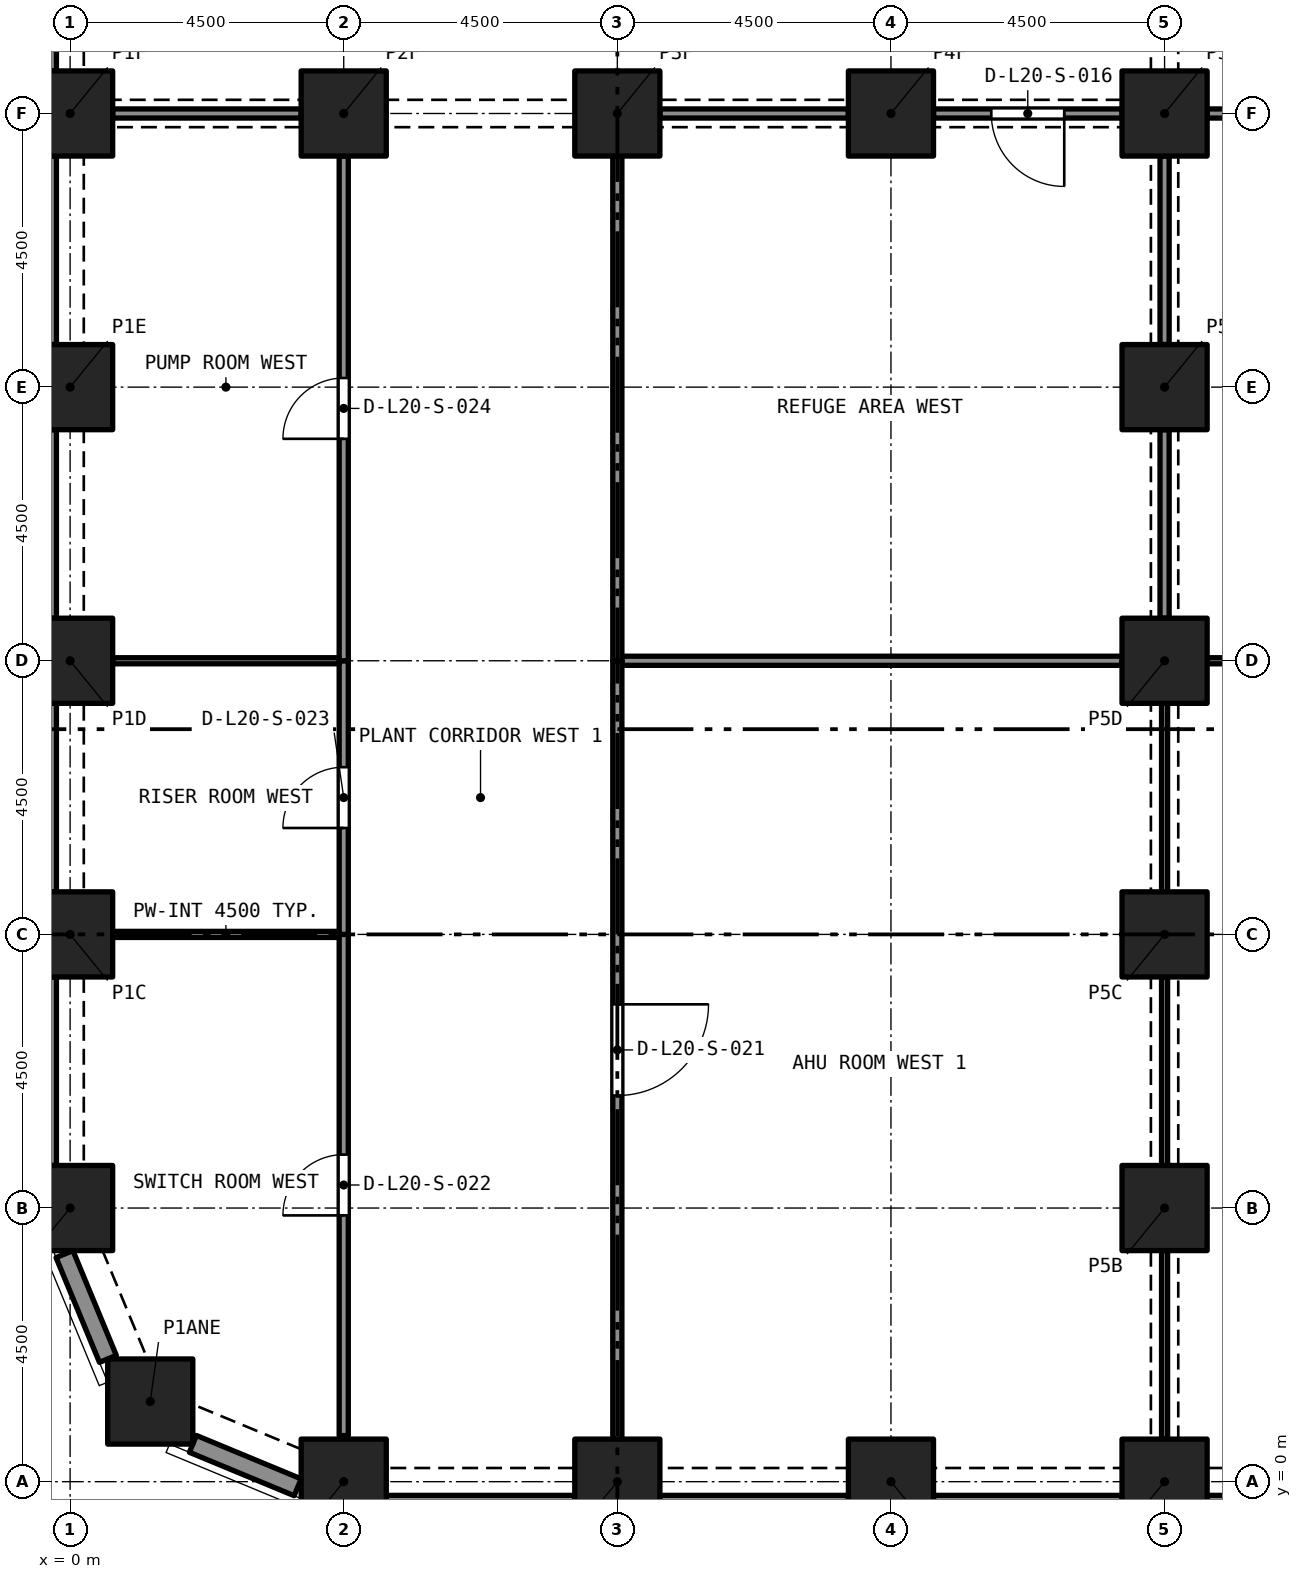
"""IFC4 building model, lengths in metres.
Left out: names, types, materials, properties, quantities, classifications, styles, units other than length and angle.
Written with IfcOpenShell. Run it as: python <this file> out.ifc"""

import sys

from ifc_helpers import new_model, si_unit, direction, frame, frame_2d, origin, origin_2d, place, context, subcontext, project, spatial, rectangle, extrude, element, fill, save


model = new_model("IFC4")
c1 = context("Model", 3, precision=1e-05, world=origin(), true_north=direction((0.0, 1.0)))
c2 = subcontext(c1, "Body", "Model", "MODEL_VIEW")
j1 = project(units=[si_unit("LENGTHUNIT", "METRE"), si_unit("PLANEANGLEUNIT", "RADIAN")], contexts=[c1])
p1 = place(None, origin())
s1 = spatial("IfcSite", under=j1, at=p1, CompositionType="ELEMENT")
p2 = place(p1, origin())
s2 = spatial("IfcBuilding", under=s1, at=p2, CompositionType="ELEMENT")
p3 = place(p2, frame((0.0, 0.0, 75.2)))
s3 = spatial("IfcBuildingStorey", under=s2, at=p3, CompositionType="ELEMENT", Elevation=75.2)
for number, where, z_axis, x_axis in (
    (1, (4.5, 0.0, 0.0), (0.0, 0.0, 1.0), (1.0, 0.0, 0.0)),
    (2, (9.0, 0.0, 0.0), (0.0, 0.0, 1.0), (1.0, 0.0, 0.0)),
    (3, (13.5, 0.0, 0.0), (0.0, 0.0, 1.0), (1.0, 0.0, 0.0)),
    (4, (18.0, 0.0, 0.0), (0.0, 0.0, 1.0), (1.0, 0.0, 0.0)),
    (5, (1.318, 1.318, 0.0), (0.0, 0.0, 1.0), (1.0, 0.0, 0.0)),
    (6, (0.0, 4.5, 0.0), (0.0, 0.0, 1.0), (1.0, 0.0, 0.0)),
    (7, (18.0, 4.5, 0.0), (0.0, 0.0, 1.0), (1.0, 0.0, 0.0)),
    (8, (0.0, 9.0, 0.0), (0.0, 0.0, 1.0), (1.0, 0.0, 0.0)),
    (9, (18.0, 9.0, 0.0), (0.0, 0.0, 1.0), (1.0, 0.0, 0.0)),
    (10, (0.0, 13.5, 0.0), (0.0, 0.0, 1.0), (1.0, 0.0, 0.0)),
    (11, (18.0, 13.5, 0.0), (0.0, 0.0, 1.0), (1.0, 0.0, 0.0)),
    (12, (0.0, 18.0, 0.0), (0.0, 0.0, 1.0), (1.0, 0.0, 0.0)),
    (13, (18.0, 18.0, 0.0), (0.0, 0.0, 1.0), (1.0, 0.0, 0.0)),
    (14, (0.0, 22.5, 0.0), (0.0, 0.0, 1.0), (1.0, 0.0, 0.0)),
    (15, (4.5, 22.5, 0.0), (0.0, 0.0, 1.0), (1.0, 0.0, 0.0)),
    (16, (9.0, 22.5, 0.0), (0.0, 0.0, 1.0), (1.0, 0.0, 0.0)),
    (17, (13.5, 22.5, 0.0), (0.0, 0.0, 1.0), (1.0, 0.0, 0.0)),
    (18, (18.0, 22.5, 0.0), (0.0, 0.0, 1.0), (1.0, 0.0, 0.0)),
):
    element("IfcColumn", number, at=place(p3, frame(where, z_axis=z_axis, x_axis=x_axis)), inside=s3, PredefinedType="COLUMN", context=c2, shape_type="SweptSolid", body=[
        extrude(rectangle(XDim=1.4, YDim=1.4, at=origin_2d()), origin(), (0.0, 0.0, 1.0), 4.8),
    ])
p4 = place(p3, frame((0.622, 2.02, 0.0), z_axis=(0.0, 0.0, 1.0), x_axis=(-0.38262540684, 0.923903565336, 0.0)))
e19 = element("IfcWall", 19, at=p4, inside=s3, PredefinedType="SOLIDWALL", context=c2, shape_type="SweptSolid", body=[
    extrude(rectangle(XDim=1.865, YDim=0.3, at=frame_2d((0.933, 0.0))), origin(), (0.0, 0.0, 1.0), 4.8),
])
p5 = place(p3, frame((3.743, -0.092, 0.0), z_axis=(0.0, 0.0, 1.0), x_axis=(-0.923857286003, 0.382737135771, 0.0)))
e20 = element("IfcWall", 20, at=p5, inside=s3, PredefinedType="SOLIDWALL", context=c2, shape_type="SweptSolid", body=[
    extrude(rectangle(XDim=1.865, YDim=0.3, at=frame_2d((0.933, 0.0))), origin(), (0.0, 0.0, 1.0), 4.8),
])
for number, where, z_axis, x_axis in (
    (21, (8.3, -0.375, 0.0), (0.0, 0.0, 1.0), (-1.0, 0.0, 0.0)),
    (22, (12.8, -0.375, 0.0), (0.0, 0.0, 1.0), (-1.0, 0.0, 0.0)),
    (23, (17.3, -0.375, 0.0), (0.0, 0.0, 1.0), (-1.0, 0.0, 0.0)),
    (24, (21.8, -0.375, 0.0), (0.0, 0.0, 1.0), (-1.0, 0.0, 0.0)),
    (25, (-0.375, 23.2, 0.0), (0.0, 0.0, 1.0), (0.0, 1.0, 0.0)),
    (26, (-0.375, 18.7, 0.0), (0.0, 0.0, 1.0), (0.0, 1.0, 0.0)),
    (27, (-0.375, 14.2, 0.0), (0.0, 0.0, 1.0), (0.0, 1.0, 0.0)),
    (28, (-0.375, 9.7, 0.0), (0.0, 0.0, 1.0), (0.0, 1.0, 0.0)),
    (29, (-0.375, 5.2, 0.0), (0.0, 0.0, 1.0), (0.0, 1.0, 0.0)),
):
    element("IfcWall", number, at=place(p3, frame(where, z_axis=z_axis, x_axis=x_axis)), inside=s3, PredefinedType="SOLIDWALL", context=c2, shape_type="SweptSolid", body=[
        extrude(rectangle(XDim=3.1, YDim=0.3, at=frame_2d((1.55, 0.0))), origin(), (0.0, 0.0, 1.0), 4.8),
    ])
p6 = place(p3, frame((30.8, 22.5, 0.0), z_axis=(0.0, 0.0, 1.0), x_axis=(-1.0, 0.0, 0.0)))
e30 = element("IfcWall", 30, at=p6, inside=s3, PredefinedType="PARTITIONING", context=c2, shape_type="SweptSolid", body=[
    extrude(rectangle(XDim=12.1, YDim=0.15, at=frame_2d((6.05, 0.0))), origin(), (0.0, 0.0, 1.0), 4.35),
])
p7 = place(p6, frame((5.3, 0.0, 0.0)))
e31 = element("IfcOpeningElement", 31, at=p7, cuts=e30, PredefinedType="OPENING", context=c2, shape_type="SweptSolid", body=[
    extrude(rectangle(XDim=1.5, YDim=2.4, at=frame_2d((0.75, 1.2))), frame((0.0, 0.085, 0.0), z_axis=(0.0, -1.0, 0.0), x_axis=(1.0, 0.0, 0.0)), (0.0, 0.0, 1.0), 0.17),
])
p8 = place(p3, frame((30.8, 13.5, 0.0), z_axis=(0.0, 0.0, 1.0), x_axis=(-1.0, 0.0, 0.0)))
e32 = element("IfcWall", 32, at=p8, inside=s3, PredefinedType="PARTITIONING", context=c2, shape_type="SweptSolid", body=[
    extrude(rectangle(XDim=12.1, YDim=0.1, at=frame_2d((6.05, 0.0))), origin(), (0.0, 0.0, 1.0), 4.35),
])
p9 = place(p8, frame((5.3, 0.0, 0.0)))
e33 = element("IfcOpeningElement", 33, at=p9, cuts=e32, PredefinedType="OPENING", context=c2, shape_type="SweptSolid", body=[
    extrude(rectangle(XDim=1.5, YDim=2.4, at=frame_2d((0.75, 1.2))), frame((0.0, 0.06, 0.0), z_axis=(0.0, -1.0, 0.0), x_axis=(1.0, 0.0, 0.0)), (0.0, 0.0, 1.0), 0.12),
])
for number, where, z_axis, x_axis in (
    (34, (18.0, 0.7, 0.0), (0.0, 0.0, 1.0), (0.0, 1.0, 0.0)),
    (35, (18.0, 5.2, 0.0), (0.0, 0.0, 1.0), (0.0, 1.0, 0.0)),
    (36, (18.0, 9.7, 0.0), (0.0, 0.0, 1.0), (0.0, 1.0, 0.0)),
):
    element("IfcWall", number, at=place(p3, frame(where, z_axis=z_axis, x_axis=x_axis)), inside=s3, PredefinedType="PARTITIONING", context=c2, shape_type="SweptSolid", body=[
        extrude(rectangle(XDim=3.1, YDim=0.1, at=frame_2d((1.55, 0.0))), origin(), (0.0, 0.0, 1.0), 3.98),
    ])
for number, where, z_axis, x_axis in (
    (37, (18.0, 14.2, 0.0), (0.0, 0.0, 1.0), (0.0, 1.0, 0.0)),
    (38, (18.0, 18.7, 0.0), (0.0, 0.0, 1.0), (0.0, 1.0, 0.0)),
):
    element("IfcWall", number, at=place(p3, frame(where, z_axis=z_axis, x_axis=x_axis)), inside=s3, PredefinedType="PARTITIONING", context=c2, shape_type="SweptSolid", body=[
        extrude(rectangle(XDim=3.1, YDim=0.15, at=frame_2d((1.55, 0.0))), origin(), (0.0, 0.0, 1.0), 3.98),
    ])
p10 = place(p3, frame((17.3, 22.5, 0.0), z_axis=(0.0, 0.0, 1.0), x_axis=(-1.0, 0.0, 0.0)))
e39 = element("IfcWall", 39, at=p10, inside=s3, PredefinedType="PARTITIONING", context=c2, shape_type="SweptSolid", body=[
    extrude(rectangle(XDim=3.1, YDim=0.15, at=frame_2d((1.55, 0.0))), origin(), (0.0, 0.0, 1.0), 3.98),
])
p11 = place(p10, frame((0.95, 0.0, 0.0)))
e40 = element("IfcOpeningElement", 40, at=p11, cuts=e39, PredefinedType="OPENING", context=c2, shape_type="SweptSolid", body=[
    extrude(rectangle(XDim=1.2, YDim=2.1, at=frame_2d((0.6, 1.05))), frame((0.0, 0.085, 0.0), z_axis=(0.0, -1.0, 0.0), x_axis=(1.0, 0.0, 0.0)), (0.0, 0.0, 1.0), 0.17),
])
for number, where, z_axis, x_axis in (
    (41, (9.7, 22.5, 0.0), (0.0, 0.0, 1.0), (1.0, 0.0, 0.0)),
    (42, (0.7, 22.5, 0.0), (0.0, 0.0, 1.0), (1.0, 0.0, 0.0)),
):
    element("IfcWall", number, at=place(p3, frame(where, z_axis=z_axis, x_axis=x_axis)), inside=s3, PredefinedType="PARTITIONING", context=c2, shape_type="SweptSolid", body=[
        extrude(rectangle(XDim=3.1, YDim=0.15, at=frame_2d((1.55, 0.0))), origin(), (0.0, 0.0, 1.0), 3.98),
    ])
p12 = place(p3, frame((9.075, 13.5, 0.0), z_axis=(0.0, 0.0, 1.0), x_axis=(1.0, 0.0, 0.0)))
e43 = element("IfcWall", 43, at=p12, inside=s3, PredefinedType="PARTITIONING", context=c2, shape_type="SweptSolid", body=[
    extrude(rectangle(XDim=8.225, YDim=0.15, at=frame_2d((4.113, 0.0))), origin(), (0.0, 0.0, 1.0), 4.5),
])
p13 = place(p3, frame((9.0, 13.5, 0.0), z_axis=(0.0, 0.0, 1.0), x_axis=(0.0, -1.0, 0.0)))
e44 = element("IfcWall", 44, at=p13, inside=s3, PredefinedType="PARTITIONING", context=c2, shape_type="SweptSolid", body=[
    extrude(rectangle(XDim=12.8, YDim=0.15, at=frame_2d((6.4, 0.0))), origin(), (0.0, 0.0, 1.0), 4.5),
])
p14 = place(p13, frame((5.65, 0.0, 0.0)))
e45 = element("IfcOpeningElement", 45, at=p14, cuts=e44, PredefinedType="OPENING", context=c2, shape_type="SweptSolid", body=[
    extrude(rectangle(XDim=1.5, YDim=2.4, at=frame_2d((0.75, 1.2))), frame((0.0, 0.085, 0.0), z_axis=(0.0, -1.0, 0.0), x_axis=(1.0, 0.0, 0.0)), (0.0, 0.0, 1.0), 0.17),
])
p15 = place(p3, frame((9.0, 13.5, 0.0), z_axis=(0.0, 0.0, 1.0), x_axis=(0.0, 1.0, 0.0)))
e46 = element("IfcWall", 46, at=p15, inside=s3, PredefinedType="PARTITIONING", context=c2, shape_type="SweptSolid", body=[
    extrude(rectangle(XDim=8.3, YDim=0.15, at=frame_2d((4.15, 0.0))), origin(), (0.0, 0.0, 1.0), 4.5),
])
p16 = place(p3, frame((4.5, 0.758, 0.0), z_axis=(0.0, 0.0, 1.0), x_axis=(0.0, 1.0, 0.0)))
e47 = element("IfcWall", 47, at=p16, inside=s3, PredefinedType="PARTITIONING", context=c2, shape_type="SweptSolid", body=[
    extrude(rectangle(XDim=8.242, YDim=0.15, at=frame_2d((4.121, 0.0))), origin(), (0.0, 0.0, 1.0), 4.5),
])
p17 = place(p16, frame((3.621, 0.0, 0.0)))
e48 = element("IfcOpeningElement", 48, at=p17, cuts=e47, PredefinedType="OPENING", context=c2, shape_type="SweptSolid", body=[
    extrude(rectangle(XDim=1.0, YDim=2.1, at=frame_2d((0.5, 1.05))), frame((0.0, 0.085, 0.0), z_axis=(0.0, -1.0, 0.0), x_axis=(1.0, 0.0, 0.0)), (0.0, 0.0, 1.0), 0.17),
])
p18 = place(p3, frame((4.5, 9.0, 0.0), z_axis=(0.0, 0.0, 1.0), x_axis=(0.0, 1.0, 0.0)))
e49 = element("IfcWall", 49, at=p18, inside=s3, PredefinedType="PARTITIONING", context=c2, shape_type="SweptSolid", body=[
    extrude(rectangle(XDim=4.5, YDim=0.15, at=frame_2d((2.25, 0.0))), origin(), (0.0, 0.0, 1.0), 4.5),
])
p19 = place(p18, frame((1.75, 0.0, 0.0)))
e50 = element("IfcOpeningElement", 50, at=p19, cuts=e49, PredefinedType="OPENING", context=c2, shape_type="SweptSolid", body=[
    extrude(rectangle(XDim=1.0, YDim=2.1, at=frame_2d((0.5, 1.05))), frame((0.0, 0.085, 0.0), z_axis=(0.0, -1.0, 0.0), x_axis=(1.0, 0.0, 0.0)), (0.0, 0.0, 1.0), 0.17),
])
p20 = place(p3, frame((4.5, 13.5, 0.0), z_axis=(0.0, 0.0, 1.0), x_axis=(0.0, 1.0, 0.0)))
e51 = element("IfcWall", 51, at=p20, inside=s3, PredefinedType="PARTITIONING", context=c2, shape_type="SweptSolid", body=[
    extrude(rectangle(XDim=8.3, YDim=0.15, at=frame_2d((4.15, 0.0))), origin(), (0.0, 0.0, 1.0), 4.5),
])
p21 = place(p20, frame((3.65, 0.0, 0.0)))
e52 = element("IfcOpeningElement", 52, at=p21, cuts=e51, PredefinedType="OPENING", context=c2, shape_type="SweptSolid", body=[
    extrude(rectangle(XDim=1.0, YDim=2.1, at=frame_2d((0.5, 1.05))), frame((0.0, 0.085, 0.0), z_axis=(0.0, -1.0, 0.0), x_axis=(1.0, 0.0, 0.0)), (0.0, 0.0, 1.0), 0.17),
])
for number, where, z_axis, x_axis in (
    (53, (0.7, 9.0, 0.0), (0.0, 0.0, 1.0), (1.0, 0.0, 0.0)),
    (54, (0.7, 13.5, 0.0), (0.0, 0.0, 1.0), (1.0, 0.0, 0.0)),
):
    element("IfcWall", number, at=place(p3, frame(where, z_axis=z_axis, x_axis=x_axis)), inside=s3, PredefinedType="PARTITIONING", context=c2, shape_type="SweptSolid", body=[
        extrude(rectangle(XDim=3.725, YDim=0.1, at=frame_2d((1.863, 0.0))), origin(), (0.0, 0.0, 1.0), 4.5),
    ])
p22 = place(p11, origin())
e55 = element("IfcDoor", 55, at=p22, inside=s3, OperationType="SINGLE_SWING_LEFT", PredefinedType="DOOR", context=c2, shape_type="SweptSolid", body=[
    extrude(rectangle(XDim=1.2, YDim=2.1, at=frame_2d((0.6, 1.05))), frame((0.0, 0.025, 0.0), z_axis=(0.0, -1.0, 0.0), x_axis=(1.0, 0.0, 0.0)), (0.0, 0.0, 1.0), 0.05),
])
fill(e40, e55)
p23 = place(p14, origin())
e56 = element("IfcDoor", 56, at=p23, inside=s3, OperationType="DOUBLE_DOOR_SINGLE_SWING", PredefinedType="DOOR", context=c2, shape_type="SweptSolid", body=[
    extrude(rectangle(XDim=1.5, YDim=2.4, at=frame_2d((0.75, 1.2))), frame((0.0, 0.025, 0.0), z_axis=(0.0, -1.0, 0.0), x_axis=(1.0, 0.0, 0.0)), (0.0, 0.0, 1.0), 0.05),
])
fill(e45, e56)
p24 = place(p17, origin())
e57 = element("IfcDoor", 57, at=p24, inside=s3, OperationType="SINGLE_SWING_RIGHT", PredefinedType="DOOR", context=c2, shape_type="SweptSolid", body=[
    extrude(rectangle(XDim=1.0, YDim=2.1, at=frame_2d((0.5, 1.05))), frame((0.0, 0.025, 0.0), z_axis=(0.0, -1.0, 0.0), x_axis=(1.0, 0.0, 0.0)), (0.0, 0.0, 1.0), 0.05),
])
fill(e48, e57)
p25 = place(p19, origin())
e58 = element("IfcDoor", 58, at=p25, inside=s3, OperationType="SINGLE_SWING_RIGHT", PredefinedType="DOOR", context=c2, shape_type="SweptSolid", body=[
    extrude(rectangle(XDim=1.0, YDim=2.1, at=frame_2d((0.5, 1.05))), frame((0.0, 0.025, 0.0), z_axis=(0.0, -1.0, 0.0), x_axis=(1.0, 0.0, 0.0)), (0.0, 0.0, 1.0), 0.05),
])
fill(e50, e58)
p26 = place(p21, origin())
e59 = element("IfcDoor", 59, at=p26, inside=s3, OperationType="SINGLE_SWING_RIGHT", PredefinedType="DOOR", context=c2, shape_type="SweptSolid", body=[
    extrude(rectangle(XDim=1.0, YDim=2.1, at=frame_2d((0.5, 1.05))), frame((0.0, 0.025, 0.0), z_axis=(0.0, -1.0, 0.0), x_axis=(1.0, 0.0, 0.0)), (0.0, 0.0, 1.0), 0.05),
])
fill(e52, e59)
save(model, sys.argv[1])
